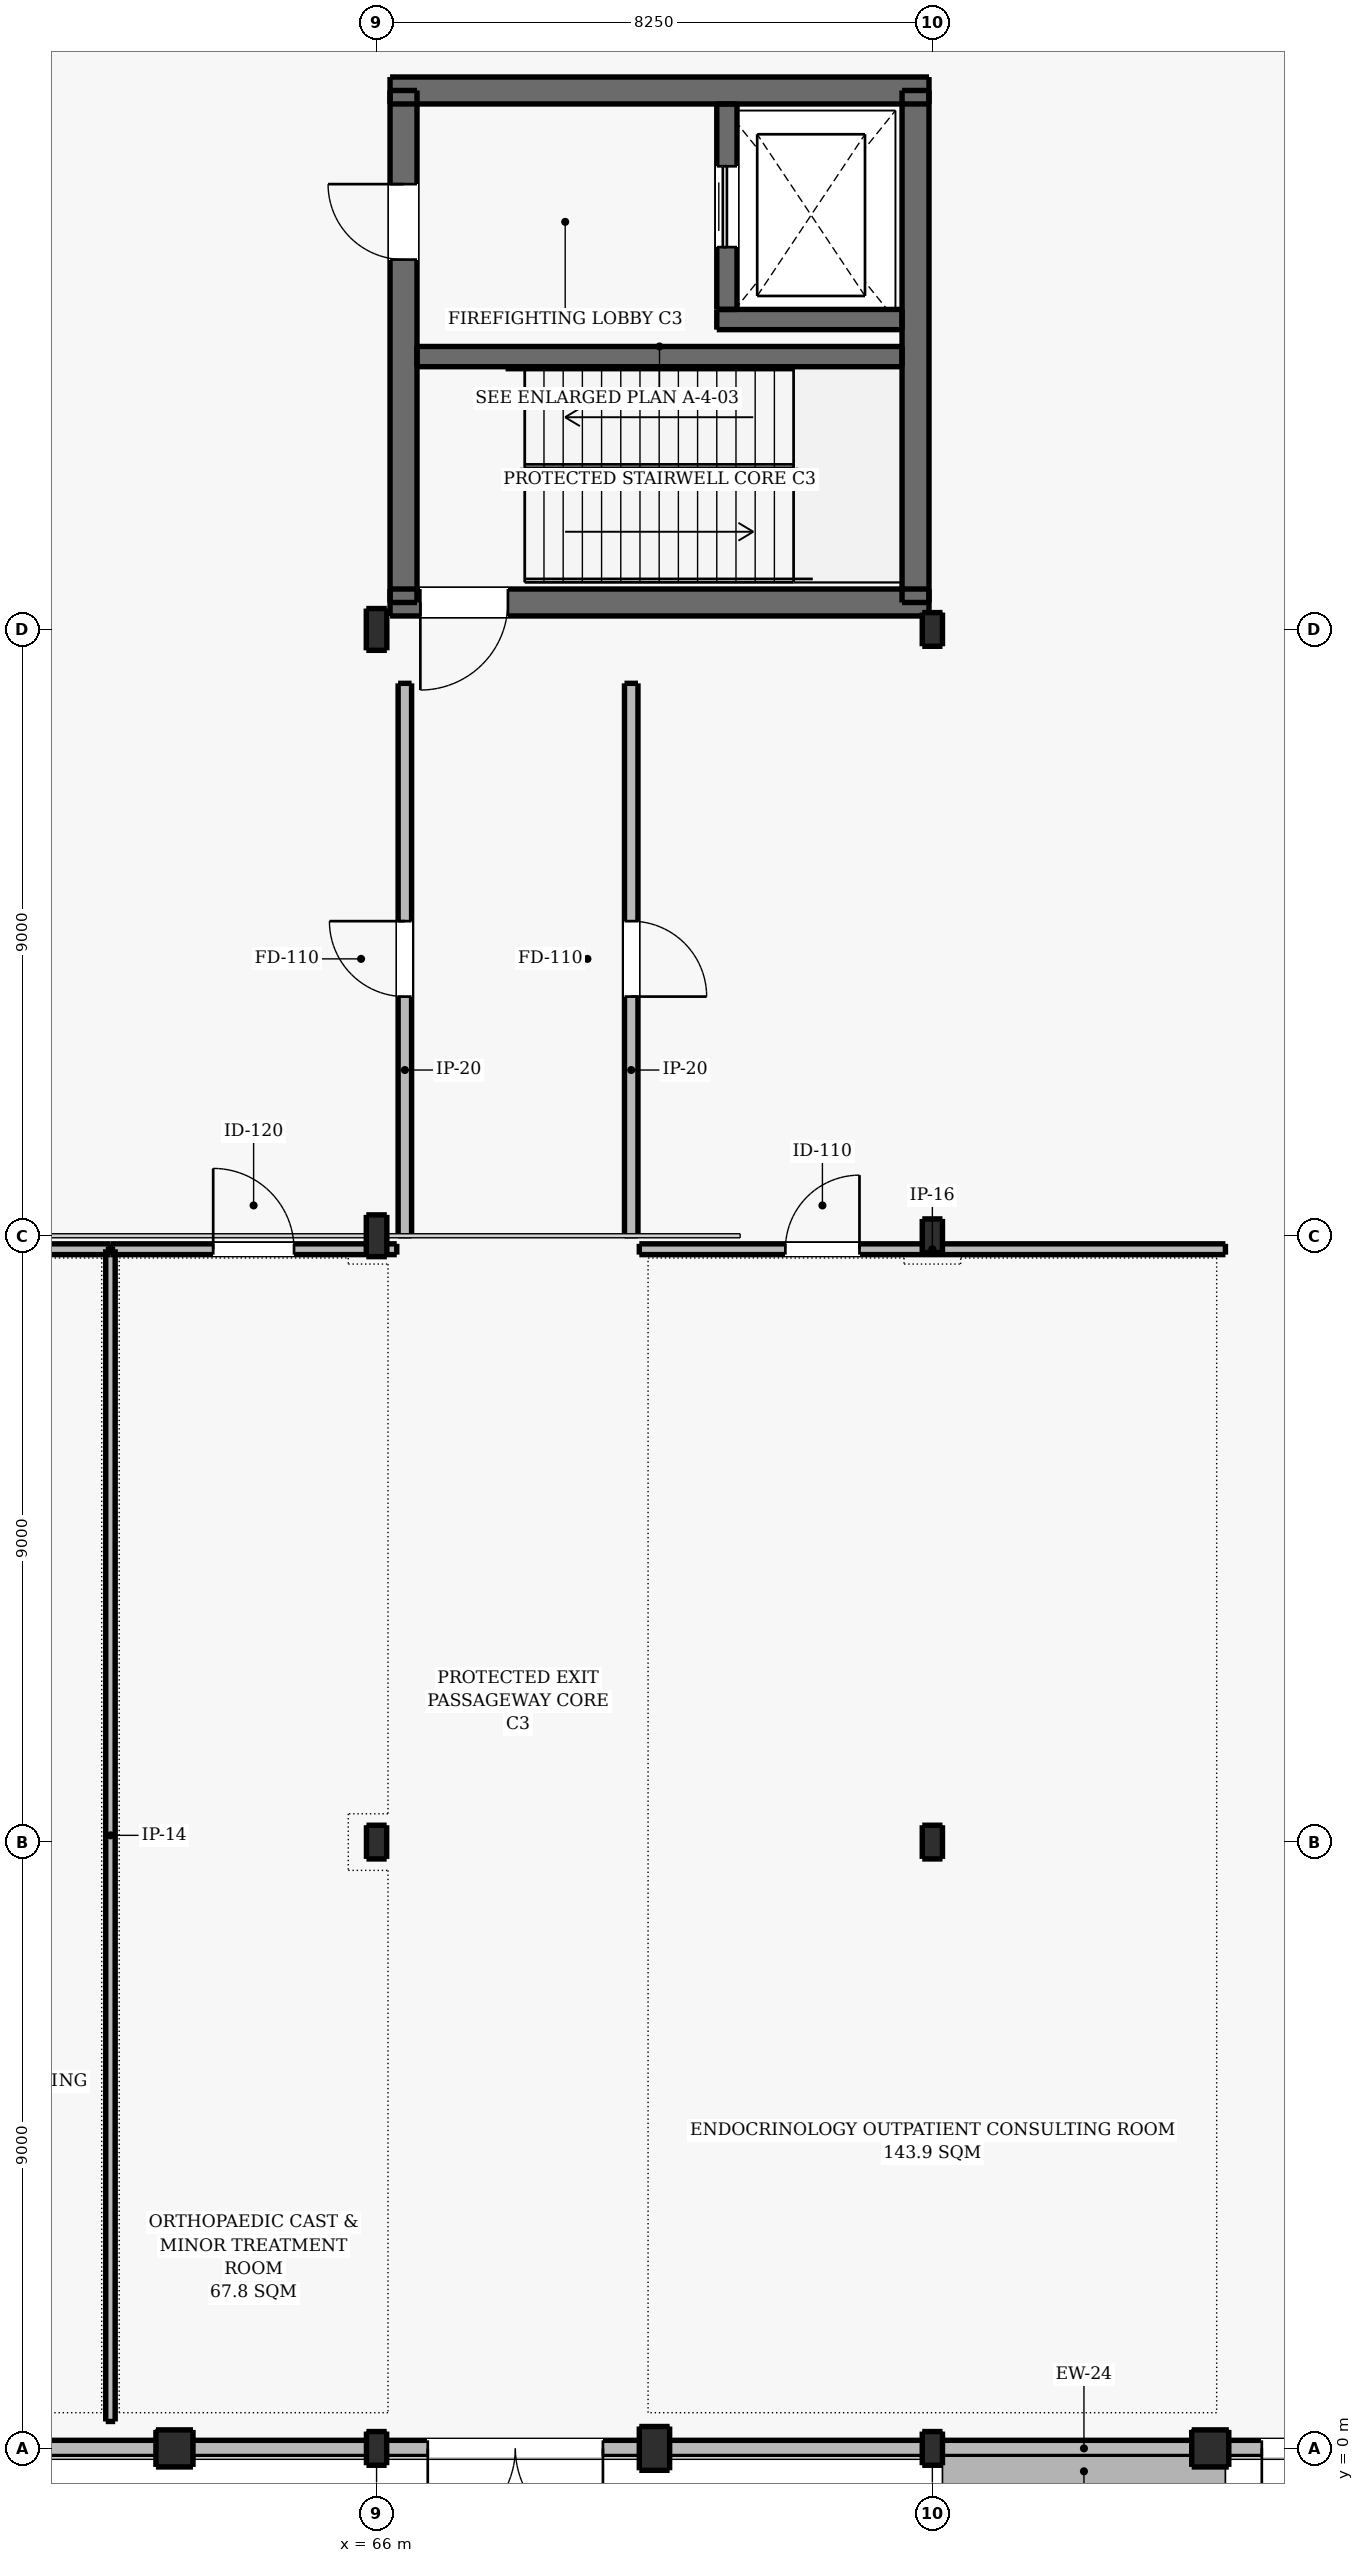
"""IFC4 building model, lengths in metres.
Left out: names, types, materials, properties, quantities, classifications, styles, units other than length and angle.
Written with IfcOpenShell. Run it as: python <this file> out.ifc"""

import sys

from ifc_helpers import new_model, si_unit, direction, frame, frame_2d, origin, origin_2d, place, context, subcontext, project, spatial, rectangle, i_section, extrude, element, fill, save


model = new_model("IFC4")
c1 = context("Model", 3, precision=1e-05, world=origin(), true_north=direction((0.0, 1.0)))
c2 = subcontext(c1, "Body", "Model", "MODEL_VIEW")
j1 = project(units=[si_unit("LENGTHUNIT", "METRE"), si_unit("PLANEANGLEUNIT", "RADIAN")], contexts=[c1])
p1 = place(None, origin())
s1 = spatial("IfcSite", under=j1, at=p1, CompositionType="ELEMENT")
p2 = place(p1, origin())
s2 = spatial("IfcBuilding", under=s1, at=p2, CompositionType="ELEMENT")
p3 = place(p2, origin())
s3 = spatial("IfcBuildingStorey", under=s2, at=p3, CompositionType="ELEMENT", Elevation=0.0)
p4 = place(p3, frame((63.0, 0.0, 0.0), z_axis=(0.0, 0.0, 1.0), x_axis=(1.0, 0.0, 0.0)))
e1 = element("IfcColumn", 1, at=p4, inside=s3, PredefinedType="PILASTER", context=c2, shape_type="SweptSolid", body=[
    extrude(rectangle(XDim=0.55, YDim=0.55, at=origin_2d()), origin(), (0.0, 0.0, 1.0), 5.1),
])
for number, where, z_axis, x_axis in (
    (2, (66.0, 0.0, 0.0), (0.0, 0.0, 1.0), (1.0, 0.0, 0.0)),
    (3, (66.0, 9.0, 0.0), (0.0, 0.0, 1.0), (1.0, 0.0, 0.0)),
):
    element("IfcColumn", number, at=place(p3, frame(where, z_axis=z_axis, x_axis=x_axis)), inside=s3, PredefinedType="COLUMN", context=c2, shape_type="SweptSolid", body=[
        extrude(i_section(OverallWidth=0.3, OverallDepth=0.5, WebThickness=0.014, FlangeThickness=0.028, FilletRadius=0.027, at=origin_2d()), origin(), (0.0, 0.0, 1.0), 5.1),
    ])
for number, where, z_axis, x_axis in (
    (4, (66.0, 18.0, 0.0), (0.0, 0.0, 1.0), (1.0, 0.0, 0.0)),
    (5, (66.0, 27.0, 0.0), (0.0, 0.0, 1.0), (1.0, 0.0, 0.0)),
):
    element("IfcColumn", number, at=place(p3, frame(where, z_axis=z_axis, x_axis=x_axis)), inside=s3, PredefinedType="COLUMN", context=c2, shape_type="SweptSolid", body=[
        extrude(i_section(OverallWidth=0.305, OverallDepth=0.62, WebThickness=0.021, FlangeThickness=0.04, FilletRadius=0.027, at=origin_2d()), origin(), (0.0, 0.0, 1.0), 5.1),
    ])
p5 = place(p3, frame((70.125, 0.0, 0.0), z_axis=(0.0, 0.0, 1.0), x_axis=(1.0, 0.0, 0.0)))
e6 = element("IfcColumn", 6, at=p5, inside=s3, PredefinedType="PILASTER", context=c2, shape_type="SweptSolid", body=[
    extrude(rectangle(XDim=0.45, YDim=0.65, at=origin_2d()), origin(), (0.0, 0.0, 1.0), 5.1),
])
for number, where, z_axis, x_axis in (
    (7, (74.25, 0.0, 0.0), (0.0, 0.0, 1.0), (1.0, 0.0, 0.0)),
    (8, (74.25, 9.0, 0.0), (0.0, 0.0, 1.0), (1.0, 0.0, 0.0)),
    (9, (74.25, 18.0, 0.0), (0.0, 0.0, 1.0), (1.0, 0.0, 0.0)),
    (10, (74.25, 27.0, 0.0), (0.0, 0.0, 1.0), (1.0, 0.0, 0.0)),
):
    element("IfcColumn", number, at=place(p3, frame(where, z_axis=z_axis, x_axis=x_axis)), inside=s3, PredefinedType="COLUMN", context=c2, shape_type="SweptSolid", body=[
        extrude(i_section(OverallWidth=0.3, OverallDepth=0.5, WebThickness=0.014, FlangeThickness=0.028, FilletRadius=0.027, at=origin_2d()), origin(), (0.0, 0.0, 1.0), 5.1),
    ])
p6 = place(p3, frame((78.375, 0.0, 0.0), z_axis=(0.0, 0.0, 1.0), x_axis=(1.0, 0.0, 0.0)))
e11 = element("IfcColumn", 11, at=p6, inside=s3, PredefinedType="PILASTER", context=c2, shape_type="SweptSolid", body=[
    extrude(rectangle(XDim=0.55, YDim=0.55, at=origin_2d()), origin(), (0.0, 0.0, 1.0), 5.1),
])
p7 = place(p3, frame((66.2, 27.4, 0.0), z_axis=(0.0, 0.0, 1.0), x_axis=(1.0, 0.0, 0.0)))
e12 = element("IfcWall", 12, at=p7, inside=s3, PredefinedType="SHEAR", context=c2, shape_type="SweptSolid", body=[
    extrude(rectangle(XDim=8.0, YDim=0.4, at=frame_2d((4.0, 0.0))), origin(), (0.0, 0.0, 1.0), 5.1),
])
p8 = place(p7, frame((0.45, 0.0, 0.0)))
e13 = element("IfcOpeningElement", 13, at=p8, cuts=e12, PredefinedType="OPENING", context=c2, shape_type="SweptSolid", body=[
    extrude(rectangle(XDim=1.3, YDim=2.15, at=frame_2d((0.65, 1.075))), frame((0.0, 0.21, 0.0), z_axis=(0.0, -1.0, 0.0), x_axis=(1.0, 0.0, 0.0)), (0.0, 0.0, 1.0), 0.42),
])
p9 = place(p3, frame((66.2, 35.0, 0.0), z_axis=(0.0, 0.0, 1.0), x_axis=(1.0, 0.0, 0.0)))
e14 = element("IfcWall", 14, at=p9, inside=s3, PredefinedType="SHEAR", context=c2, shape_type="SweptSolid", body=[
    extrude(rectangle(XDim=8.0, YDim=0.4, at=frame_2d((4.0, 0.0))), origin(), (0.0, 0.0, 1.0), 5.1),
])
p10 = place(p3, frame((66.4, 27.4, 0.0), z_axis=(0.0, 0.0, 1.0), x_axis=(0.0, 1.0, 0.0)))
e15 = element("IfcWall", 15, at=p10, inside=s3, PredefinedType="SHEAR", context=c2, shape_type="SweptSolid", body=[
    extrude(rectangle(XDim=7.6, YDim=0.4, at=frame_2d((3.8, 0.0))), origin(), (0.0, 0.0, 1.0), 5.1),
])
p11 = place(p10, frame((5.09, 0.0, 0.0)))
e16 = element("IfcOpeningElement", 16, at=p11, cuts=e15, PredefinedType="OPENING", context=c2, shape_type="SweptSolid", body=[
    extrude(rectangle(XDim=1.12, YDim=2.15, at=frame_2d((0.56, 1.075))), frame((0.0, 0.21, 0.0), z_axis=(0.0, -1.0, 0.0), x_axis=(1.0, 0.0, 0.0)), (0.0, 0.0, 1.0), 0.42),
])
p12 = place(p3, frame((74.0, 27.4, 0.0), z_axis=(0.0, 0.0, 1.0), x_axis=(0.0, 1.0, 0.0)))
e17 = element("IfcWall", 17, at=p12, inside=s3, PredefinedType="SHEAR", context=c2, shape_type="SweptSolid", body=[
    extrude(rectangle(XDim=7.6, YDim=0.4, at=frame_2d((3.8, 0.0))), origin(), (0.0, 0.0, 1.0), 5.1),
])
p13 = place(p3, frame((66.6, 31.05, 0.0), z_axis=(0.0, 0.0, 1.0), x_axis=(1.0, 0.0, 0.0)))
e18 = element("IfcWall", 18, at=p13, inside=s3, PredefinedType="SHEAR", context=c2, shape_type="SweptSolid", body=[
    extrude(rectangle(XDim=7.2, YDim=0.3, at=frame_2d((3.6, 0.0))), origin(), (0.0, 0.0, 1.0), 5.1),
])
p14 = place(p3, frame((71.05, 31.6, 0.0), z_axis=(0.0, 0.0, 1.0), x_axis=(1.0, 0.0, 0.0)))
e19 = element("IfcWall", 19, at=p14, inside=s3, PredefinedType="SHEAR", context=c2, shape_type="SweptSolid", body=[
    extrude(rectangle(XDim=2.75, YDim=0.3, at=frame_2d((1.375, 0.0))), origin(), (0.0, 0.0, 1.0), 5.1),
])
p15 = place(p3, frame((71.2, 31.75, 0.0), z_axis=(0.0, 0.0, 1.0), x_axis=(0.0, 1.0, 0.0)))
e20 = element("IfcWall", 20, at=p15, inside=s3, PredefinedType="SHEAR", context=c2, shape_type="SweptSolid", body=[
    extrude(rectangle(XDim=3.05, YDim=0.3, at=frame_2d((1.525, 0.0))), origin(), (0.0, 0.0, 1.0), 5.1),
])
p16 = place(p15, frame((0.925, 0.0, 0.0)))
e21 = element("IfcOpeningElement", 21, at=p16, cuts=e20, PredefinedType="OPENING", context=c2, shape_type="SweptSolid", body=[
    extrude(rectangle(XDim=1.2, YDim=2.15, at=frame_2d((0.6, 1.075))), frame((0.0, 0.16, 0.0), z_axis=(0.0, -1.0, 0.0), x_axis=(1.0, 0.0, 0.0)), (0.0, 0.0, 1.0), 0.32),
])
p17 = place(p3, frame((99.0, 0.0, 0.0), z_axis=(0.0, 0.0, 1.0), x_axis=(-1.0, 0.0, 0.0)))
e22 = element("IfcWall", 22, at=p17, inside=s3, PredefinedType="SOLIDWALL", context=c2, shape_type="SweptSolid", body=[
    extrude(rectangle(XDim=45.0, YDim=0.24, at=frame_2d((22.5, 0.0))), origin(), (0.0, 0.0, 1.0), 4.31),
])
p18 = place(p17, frame((29.64, 0.0, 0.0)))
e23 = element("IfcOpeningElement", 23, at=p18, cuts=e22, PredefinedType="OPENING", context=c2, shape_type="SweptSolid", body=[
    extrude(rectangle(XDim=2.6, YDim=2.6, at=frame_2d((1.3, 1.3))), frame((0.0, 0.13, 0.0), z_axis=(0.0, -1.0, 0.0), x_axis=(1.0, 0.0, 0.0)), (0.0, 0.0, 1.0), 0.26),
])
p19 = place(p17, frame((17.26, 0.0, 0.0)))
e24 = element("IfcOpeningElement", 24, at=p19, cuts=e22, PredefinedType="OPENING", context=c2, shape_type="SweptSolid", body=[
    extrude(rectangle(XDim=2.6, YDim=2.6, at=frame_2d((1.3, 1.3))), frame((0.0, 0.13, 0.0), z_axis=(0.0, -1.0, 0.0), x_axis=(1.0, 0.0, 0.0)), (0.0, 0.0, 1.0), 0.26),
])
p20 = place(p17, frame((9.01, 0.0, 0.0)))
e25 = element("IfcOpeningElement", 25, at=p20, cuts=e22, PredefinedType="OPENING", context=c2, shape_type="SweptSolid", body=[
    extrude(rectangle(XDim=2.6, YDim=2.6, at=frame_2d((1.3, 1.3))), frame((0.0, 0.13, 0.0), z_axis=(0.0, -1.0, 0.0), x_axis=(1.0, 0.0, 0.0)), (0.0, 0.0, 1.0), 0.26),
])
p21 = place(p17, frame((1.65, 0.0, 1.05)))
e26 = element("IfcOpeningElement", 26, at=p21, cuts=e22, PredefinedType="OPENING", context=c2, shape_type="SweptSolid", body=[
    extrude(rectangle(XDim=1.2, YDim=1.5, at=frame_2d((0.6, 0.75))), frame((0.0, 0.13, 0.0), z_axis=(0.0, -1.0, 0.0), x_axis=(1.0, 0.0, 0.0)), (0.0, 0.0, 1.0), 0.26),
])
p22 = place(p17, frame((6.15, 0.0, 1.05)))
e27 = element("IfcOpeningElement", 27, at=p22, cuts=e22, PredefinedType="OPENING", context=c2, shape_type="SweptSolid", body=[
    extrude(rectangle(XDim=1.2, YDim=1.5, at=frame_2d((0.6, 0.75))), frame((0.0, 0.13, 0.0), z_axis=(0.0, -1.0, 0.0), x_axis=(1.0, 0.0, 0.0)), (0.0, 0.0, 1.0), 0.26),
])
p23 = place(p3, frame((66.42, 18.0, 0.0), z_axis=(0.0, 0.0, 1.0), x_axis=(0.0, 1.0, 0.0)))
e28 = element("IfcWall", 28, at=p23, inside=s3, PredefinedType="PARTITIONING", context=c2, shape_type="SweptSolid", body=[
    extrude(rectangle(XDim=8.2, YDim=0.2, at=frame_2d((4.1, 0.0))), origin(), (0.0, 0.0, 1.0), 4.82),
])
p24 = place(p23, frame((3.55, 0.0, 0.0)))
e29 = element("IfcOpeningElement", 29, at=p24, cuts=e28, PredefinedType="OPENING", context=c2, shape_type="SweptSolid", body=[
    extrude(rectangle(XDim=1.12, YDim=2.15, at=frame_2d((0.56, 1.075))), frame((0.0, 0.11, 0.0), z_axis=(0.0, -1.0, 0.0), x_axis=(1.0, 0.0, 0.0)), (0.0, 0.0, 1.0), 0.22),
])
p25 = place(p3, frame((69.78, 18.0, 0.0), z_axis=(0.0, 0.0, 1.0), x_axis=(0.0, 1.0, 0.0)))
e30 = element("IfcWall", 30, at=p25, inside=s3, PredefinedType="PARTITIONING", context=c2, shape_type="SweptSolid", body=[
    extrude(rectangle(XDim=8.2, YDim=0.2, at=frame_2d((4.1, 0.0))), origin(), (0.0, 0.0, 1.0), 4.82),
])
p26 = place(p25, frame((3.55, 0.0, 0.0)))
e31 = element("IfcOpeningElement", 31, at=p26, cuts=e30, PredefinedType="OPENING", context=c2, shape_type="SweptSolid", body=[
    extrude(rectangle(XDim=1.12, YDim=2.15, at=frame_2d((0.56, 1.075))), frame((0.0, 0.11, 0.0), z_axis=(0.0, -1.0, 0.0), x_axis=(1.0, 0.0, 0.0)), (0.0, 0.0, 1.0), 0.22),
])
p27 = place(p3, frame((57.8, 17.8, 0.0), z_axis=(0.0, 0.0, 1.0), x_axis=(1.0, 0.0, 0.0)))
e32 = element("IfcWall", 32, at=p27, inside=s3, PredefinedType="PARTITIONING", context=c2, shape_type="SweptSolid", body=[
    extrude(rectangle(XDim=4.25, YDim=0.16, at=frame_2d((2.125, 0.0))), origin(), (0.0, 0.0, 1.0), 4.26),
])
p28 = place(p27, frame((1.575, 0.0, 0.0)))
e33 = element("IfcOpeningElement", 33, at=p28, cuts=e32, PredefinedType="OPENING", context=c2, shape_type="SweptSolid", body=[
    extrude(rectangle(XDim=1.1, YDim=2.15, at=frame_2d((0.55, 1.075))), frame((0.0, 0.09, 0.0), z_axis=(0.0, -1.0, 0.0), x_axis=(1.0, 0.0, 0.0)), (0.0, 0.0, 1.0), 0.18),
])
p29 = place(p3, frame((62.05, 0.4, 0.0), z_axis=(0.0, 0.0, 1.0), x_axis=(0.0, 1.0, 0.0)))
e34 = element("IfcWall", 34, at=p29, inside=s3, PredefinedType="PARTITIONING", context=c2, shape_type="SweptSolid", body=[
    extrude(rectangle(XDim=17.4, YDim=0.14, at=frame_2d((8.7, 0.0))), origin(), (0.0, 0.0, 1.0), 4.31),
])
p30 = place(p3, frame((62.05, 17.8, 0.0), z_axis=(0.0, 0.0, 1.0), x_axis=(1.0, 0.0, 0.0)))
e35 = element("IfcWall", 35, at=p30, inside=s3, PredefinedType="PARTITIONING", context=c2, shape_type="SweptSolid", body=[
    extrude(rectangle(XDim=4.25, YDim=0.16, at=frame_2d((2.125, 0.0))), origin(), (0.0, 0.0, 1.0), 4.26),
])
p31 = place(p30, frame((1.525, 0.0, 0.0)))
e36 = element("IfcOpeningElement", 36, at=p31, cuts=e35, PredefinedType="OPENING", context=c2, shape_type="SweptSolid", body=[
    extrude(rectangle(XDim=1.2, YDim=2.2, at=frame_2d((0.6, 1.1))), frame((0.0, 0.09, 0.0), z_axis=(0.0, -1.0, 0.0), x_axis=(1.0, 0.0, 0.0)), (0.0, 0.0, 1.0), 0.18),
])
p32 = place(p3, frame((69.9, 17.8, 0.0), z_axis=(0.0, 0.0, 1.0), x_axis=(1.0, 0.0, 0.0)))
e37 = element("IfcWall", 37, at=p32, inside=s3, PredefinedType="PARTITIONING", context=c2, shape_type="SweptSolid", body=[
    extrude(rectangle(XDim=8.7, YDim=0.16, at=frame_2d((4.35, 0.0))), origin(), (0.0, 0.0, 1.0), 4.31),
])
p33 = place(p32, frame((2.168, 0.0, 0.0)))
e38 = element("IfcOpeningElement", 38, at=p33, cuts=e37, PredefinedType="OPENING", context=c2, shape_type="SweptSolid", body=[
    extrude(rectangle(XDim=1.1, YDim=2.15, at=frame_2d((0.55, 1.075))), frame((0.0, 0.09, 0.0), z_axis=(0.0, -1.0, 0.0), x_axis=(1.0, 0.0, 0.0)), (0.0, 0.0, 1.0), 0.18),
])
p34 = place(p18, origin())
e39 = element("IfcDoor", 39, at=p34, inside=s3, OperationType="DOUBLE_DOOR_SINGLE_SWING", PredefinedType="DOOR", context=c2, shape_type="SweptSolid", body=[
    extrude(rectangle(XDim=2.6, YDim=2.6, at=frame_2d((1.3, 1.3))), frame((0.0, 0.025, 0.0), z_axis=(0.0, -1.0, 0.0), x_axis=(1.0, 0.0, 0.0)), (0.0, 0.0, 1.0), 0.05),
])
fill(e23, e39)
p35 = place(p19, origin())
e40 = element("IfcDoor", 40, at=p35, inside=s3, OperationType="DOUBLE_DOOR_SINGLE_SWING", PredefinedType="DOOR", context=c2, shape_type="SweptSolid", body=[
    extrude(rectangle(XDim=2.6, YDim=2.6, at=frame_2d((1.3, 1.3))), frame((0.0, 0.025, 0.0), z_axis=(0.0, -1.0, 0.0), x_axis=(1.0, 0.0, 0.0)), (0.0, 0.0, 1.0), 0.05),
])
fill(e24, e40)
p36 = place(p16, origin())
e41 = element("IfcDoor", 41, at=p36, inside=s3, OperationType="DOUBLE_DOOR_SLIDING", PredefinedType="DOOR", context=c2, shape_type="SweptSolid", body=[
    extrude(rectangle(XDim=1.2, YDim=2.15, at=frame_2d((0.6, 1.075))), frame((0.0, 0.025, 0.0), z_axis=(0.0, -1.0, 0.0), x_axis=(1.0, 0.0, 0.0)), (0.0, 0.0, 1.0), 0.05),
])
fill(e21, e41)
p37 = place(p11, origin())
e42 = element("IfcDoor", 42, at=p37, inside=s3, OperationType="SINGLE_SWING_RIGHT", PredefinedType="DOOR", context=c2, shape_type="SweptSolid", body=[
    extrude(rectangle(XDim=1.12, YDim=2.15, at=frame_2d((0.56, 1.075))), frame((0.0, 0.025, 0.0), z_axis=(0.0, -1.0, 0.0), x_axis=(1.0, 0.0, 0.0)), (0.0, 0.0, 1.0), 0.05),
])
fill(e16, e42)
p38 = place(p8, frame((1.3, 0.0, 0.0), z_axis=(0.0, 0.0, 1.0), x_axis=(-1.0, 0.0, 0.0)))
e43 = element("IfcDoor", 43, at=p38, inside=s3, OperationType="SINGLE_SWING_LEFT", PredefinedType="DOOR", context=c2, shape_type="SweptSolid", body=[
    extrude(rectangle(XDim=1.3, YDim=2.15, at=frame_2d((0.65, 1.075))), frame((0.0, 0.025, 0.0), z_axis=(0.0, -1.0, 0.0), x_axis=(1.0, 0.0, 0.0)), (0.0, 0.0, 1.0), 0.05),
])
fill(e13, e43)
p39 = place(p24, origin())
e44 = element("IfcDoor", 44, at=p39, inside=s3, OperationType="SINGLE_SWING_RIGHT", PredefinedType="DOOR", context=c2, shape_type="SweptSolid", body=[
    extrude(rectangle(XDim=1.12, YDim=2.15, at=frame_2d((0.56, 1.075))), frame((0.0, 0.025, 0.0), z_axis=(0.0, -1.0, 0.0), x_axis=(1.0, 0.0, 0.0)), (0.0, 0.0, 1.0), 0.05),
])
fill(e29, e44)
p40 = place(p26, frame((1.12, 0.0, 0.0), z_axis=(0.0, 0.0, 1.0), x_axis=(-1.0, 0.0, 0.0)))
e45 = element("IfcDoor", 45, at=p40, inside=s3, OperationType="SINGLE_SWING_LEFT", PredefinedType="DOOR", context=c2, shape_type="SweptSolid", body=[
    extrude(rectangle(XDim=1.12, YDim=2.15, at=frame_2d((0.56, 1.075))), frame((0.0, 0.025, 0.0), z_axis=(0.0, -1.0, 0.0), x_axis=(1.0, 0.0, 0.0)), (0.0, 0.0, 1.0), 0.05),
])
fill(e31, e45)
p41 = place(p31, origin())
e46 = element("IfcDoor", 46, at=p41, inside=s3, OperationType="SINGLE_SWING_LEFT", PredefinedType="DOOR", context=c2, shape_type="SweptSolid", body=[
    extrude(rectangle(XDim=1.2, YDim=2.2, at=frame_2d((0.6, 1.1))), frame((0.0, 0.025, 0.0), z_axis=(0.0, -1.0, 0.0), x_axis=(1.0, 0.0, 0.0)), (0.0, 0.0, 1.0), 0.05),
])
fill(e36, e46)
p42 = place(p33, origin())
e47 = element("IfcDoor", 47, at=p42, inside=s3, OperationType="SINGLE_SWING_RIGHT", PredefinedType="DOOR", context=c2, shape_type="SweptSolid", body=[
    extrude(rectangle(XDim=1.1, YDim=2.15, at=frame_2d((0.55, 1.075))), frame((0.0, 0.025, 0.0), z_axis=(0.0, -1.0, 0.0), x_axis=(1.0, 0.0, 0.0)), (0.0, 0.0, 1.0), 0.05),
])
fill(e38, e47)
save(model, sys.argv[1])
